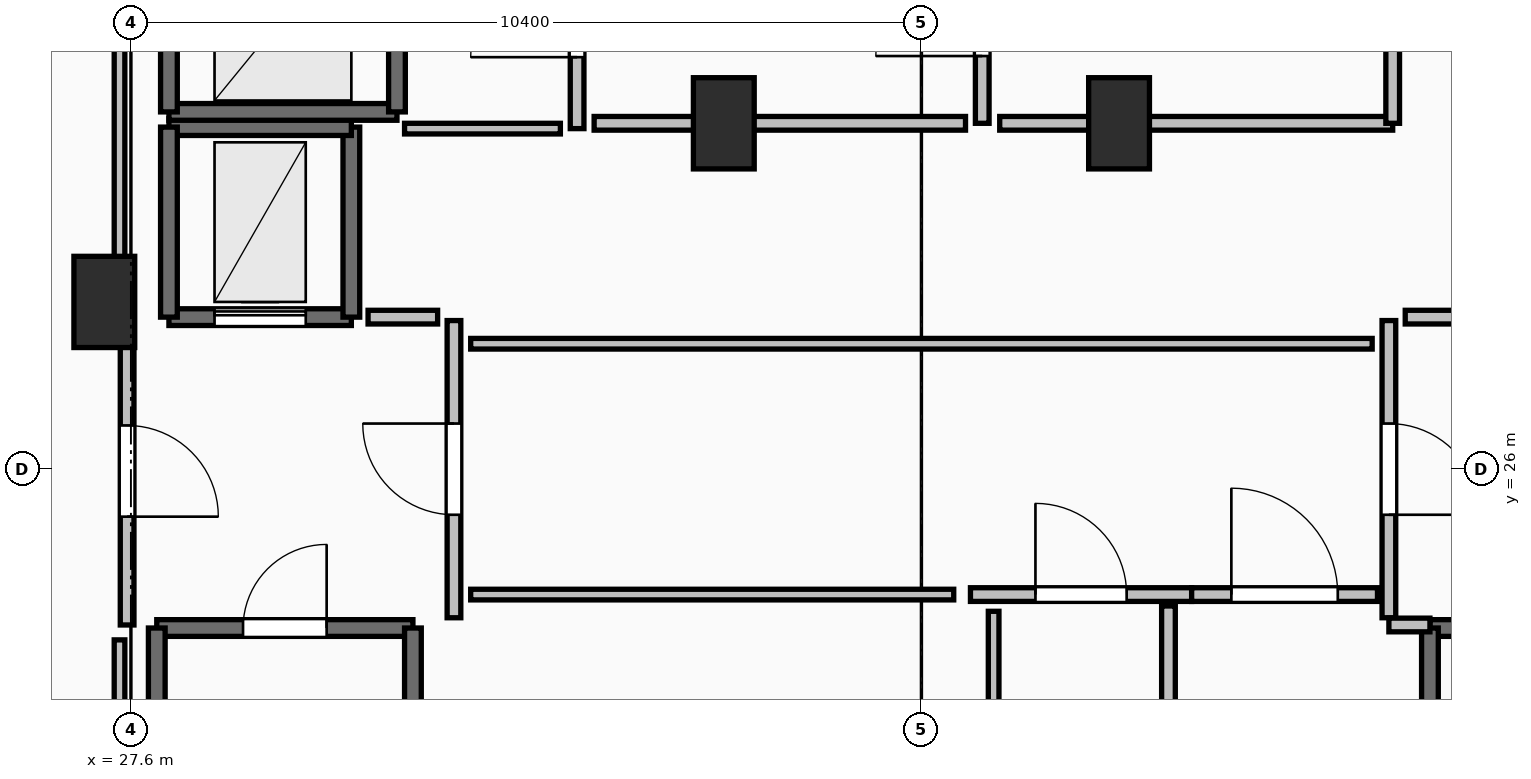
"""IFC4 building model, lengths in metres.
Left out: names, types, materials, properties, quantities, classifications, styles, units other than length and angle.
Written with IfcOpenShell. Run it as: python <this file> out.ifc"""

import sys

from ifc_helpers import new_model, si_unit, direction, frame, frame_2d, origin, origin_2d, place, context, subcontext, project, spatial, rectangle, extrude, element, fill, save


model = new_model("IFC4")
c1 = context("Model", 3, precision=1e-05, world=origin(), true_north=direction((0.0, 1.0)))
c2 = subcontext(c1, "Body", "Model", "MODEL_VIEW")
j1 = project(units=[si_unit("LENGTHUNIT", "METRE"), si_unit("PLANEANGLEUNIT", "RADIAN")], contexts=[c1])
p1 = place(None, origin())
s1 = spatial("IfcSite", under=j1, at=p1, CompositionType="ELEMENT")
p2 = place(p1, origin())
s2 = spatial("IfcBuilding", under=s1, at=p2, CompositionType="ELEMENT")
p3 = place(p2, frame((0.0, 0.0, -9.6)))
s3 = spatial("IfcBuildingStorey", under=s2, at=p3, CompositionType="ELEMENT", Elevation=-9.6)
for number, where, z_axis, x_axis in (
    (1, (27.25, 28.2, 0.0), (0.0, 0.0, 1.0), (1.0, 0.0, 0.0)),
    (2, (35.4, 30.55, 0.0), (0.0, 0.0, 1.0), (1.0, 0.0, 0.0)),
    (3, (40.6, 30.55, 0.0), (0.0, 0.0, 1.0), (1.0, 0.0, 0.0)),
):
    element("IfcColumn", number, at=place(p3, frame(where, z_axis=z_axis, x_axis=x_axis)), inside=s3, PredefinedType="PILASTER", context=c2, shape_type="SweptSolid", body=[
        extrude(rectangle(XDim=0.8, YDim=1.2, at=origin_2d()), origin(), (0.0, 0.0, 1.0), 4.8),
    ])
p4 = place(p3, frame((27.94, 23.91, 0.0), z_axis=(0.0, 0.0, 1.0), x_axis=(1.0, 0.0, 0.0)))
e4 = element("IfcWall", 4, at=p4, inside=s3, PredefinedType="SOLIDWALL", context=c2, shape_type="SweptSolid", body=[
    extrude(rectangle(XDim=3.37, YDim=0.22, at=frame_2d((1.685, 0.0))), origin(), (0.0, 0.0, 1.0), 4.45),
])
p5 = place(p4, frame((1.135, 0.0, 0.0)))
e5 = element("IfcOpeningElement", 5, at=p5, cuts=e4, PredefinedType="OPENING", context=c2, shape_type="SweptSolid", body=[
    extrude(rectangle(XDim=1.1, YDim=2.15, at=frame_2d((0.55, 1.075))), frame((0.0, 0.125, 0.0), z_axis=(0.0, -1.0, 0.0), x_axis=(1.0, 0.0, 0.0)), (0.0, 0.0, 1.0), 0.25),
])
for number, where, z_axis, x_axis in (
    (6, (31.31, 23.91, 0.0), (0.0, 0.0, 1.0), (0.0, -1.0, 0.0)),
    (7, (27.94, 16.49, 0.0), (0.0, 0.0, 1.0), (0.0, 1.0, 0.0)),
):
    element("IfcWall", number, at=place(p3, frame(where, z_axis=z_axis, x_axis=x_axis)), inside=s3, PredefinedType="SOLIDWALL", context=c2, shape_type="SweptSolid", body=[
        extrude(rectangle(XDim=7.42, YDim=0.22, at=frame_2d((3.71, 0.0))), origin(), (0.0, 0.0, 1.0), 4.45),
    ])
p6 = place(p3, frame((44.69, 23.91, 0.0), z_axis=(0.0, 0.0, 1.0), x_axis=(1.0, 0.0, 0.0)))
e8 = element("IfcWall", 8, at=p6, inside=s3, PredefinedType="SOLIDWALL", context=c2, shape_type="SweptSolid", body=[
    extrude(rectangle(XDim=3.37, YDim=0.22, at=frame_2d((1.685, 0.0))), origin(), (0.0, 0.0, 1.0), 4.45),
])
p7 = place(p6, frame((1.135, 0.0, 0.0)))
e9 = element("IfcOpeningElement", 9, at=p7, cuts=e8, PredefinedType="OPENING", context=c2, shape_type="SweptSolid", body=[
    extrude(rectangle(XDim=1.1, YDim=2.15, at=frame_2d((0.55, 1.075))), frame((0.0, 0.125, 0.0), z_axis=(0.0, -1.0, 0.0), x_axis=(1.0, 0.0, 0.0)), (0.0, 0.0, 1.0), 0.25),
])
p8 = place(p3, frame((44.69, 16.49, 0.0), z_axis=(0.0, 0.0, 1.0), x_axis=(0.0, 1.0, 0.0)))
e10 = element("IfcWall", 10, at=p8, inside=s3, PredefinedType="SOLIDWALL", context=c2, shape_type="SweptSolid", body=[
    extrude(rectangle(XDim=7.42, YDim=0.22, at=frame_2d((3.71, 0.0))), origin(), (0.0, 0.0, 1.0), 4.45),
])
p9 = place(p3, frame((28.1, 28.0, 0.0), z_axis=(0.0, 0.0, 1.0), x_axis=(1.0, 0.0, 0.0)))
e11 = element("IfcWall", 11, at=p9, inside=s3, PredefinedType="SHEAR", context=c2, shape_type="SweptSolid", body=[
    extrude(rectangle(XDim=2.4, YDim=0.22, at=frame_2d((1.2, 0.0))), origin(), (0.0, 0.0, 1.0), 4.45),
])
p10 = place(p9, frame((0.6, 0.0, 0.0)))
e12 = element("IfcOpeningElement", 12, at=p10, cuts=e11, PredefinedType="OPENING", context=c2, shape_type="SweptSolid", body=[
    extrude(rectangle(XDim=1.2, YDim=2.2, at=frame_2d((0.6, 1.1))), frame((0.0, 0.125, 0.0), z_axis=(0.0, -1.0, 0.0), x_axis=(1.0, 0.0, 0.0)), (0.0, 0.0, 1.0), 0.25),
])
p11 = place(p3, frame((30.5, 28.0, 0.0), z_axis=(0.0, 0.0, 1.0), x_axis=(0.0, 1.0, 0.0)))
e13 = element("IfcWall", 13, at=p11, inside=s3, PredefinedType="SHEAR", context=c2, shape_type="SweptSolid", body=[
    extrude(rectangle(XDim=2.5, YDim=0.22, at=frame_2d((1.25, 0.0))), origin(), (0.0, 0.0, 1.0), 4.45),
])
p12 = place(p3, frame((30.5, 30.5, 0.0), z_axis=(0.0, 0.0, 1.0), x_axis=(-1.0, 0.0, 0.0)))
e14 = element("IfcWall", 14, at=p12, inside=s3, PredefinedType="SHEAR", context=c2, shape_type="SweptSolid", body=[
    extrude(rectangle(XDim=2.4, YDim=0.22, at=frame_2d((1.2, 0.0))), origin(), (0.0, 0.0, 1.0), 4.45),
])
p13 = place(p3, frame((28.1, 30.5, 0.0), z_axis=(0.0, 0.0, 1.0), x_axis=(0.0, -1.0, 0.0)))
e15 = element("IfcWall", 15, at=p13, inside=s3, PredefinedType="SHEAR", context=c2, shape_type="SweptSolid", body=[
    extrude(rectangle(XDim=2.5, YDim=0.22, at=frame_2d((1.25, 0.0))), origin(), (0.0, 0.0, 1.0), 4.45),
])
p14 = place(p3, frame((28.1, 30.7, 0.0), z_axis=(0.0, 0.0, 1.0), x_axis=(1.0, 0.0, 0.0)))
e16 = element("IfcWall", 16, at=p14, inside=s3, PredefinedType="SOLIDWALL", context=c2, shape_type="SweptSolid", body=[
    extrude(rectangle(XDim=3.0, YDim=0.22, at=frame_2d((1.5, 0.0))), origin(), (0.0, 0.0, 1.0), 4.45),
])
for number, where, z_axis, x_axis in (
    (17, (31.1, 30.7, 0.0), (0.0, 0.0, 1.0), (0.0, 1.0, 0.0)),
    (18, (28.1, 33.2, 0.0), (0.0, 0.0, 1.0), (0.0, -1.0, 0.0)),
):
    element("IfcWall", number, at=place(p3, frame(where, z_axis=z_axis, x_axis=x_axis)), inside=s3, PredefinedType="SOLIDWALL", context=c2, shape_type="SweptSolid", body=[
        extrude(rectangle(XDim=2.5, YDim=0.22, at=frame_2d((1.25, 0.0))), origin(), (0.0, 0.0, 1.0), 4.45),
    ])
p15 = place(p3, frame((31.85, 24.045, 0.0), z_axis=(0.0, 0.0, 1.0), x_axis=(0.0, 1.0, 0.0)))
e19 = element("IfcWall", 19, at=p15, inside=s3, PredefinedType="PARTITIONING", context=c2, shape_type="SweptSolid", body=[
    extrude(rectangle(XDim=3.91, YDim=0.18, at=frame_2d((1.955, 0.0))), origin(), (0.0, 0.0, 1.0), 4.45),
])
p16 = place(p15, frame((1.355, 0.0, 0.0)))
e20 = element("IfcOpeningElement", 20, at=p16, cuts=e19, PredefinedType="OPENING", context=c2, shape_type="SweptSolid", body=[
    extrude(rectangle(XDim=1.2, YDim=2.15, at=frame_2d((0.6, 1.075))), frame((0.0, 0.105, 0.0), z_axis=(0.0, -1.0, 0.0), x_axis=(1.0, 0.0, 0.0)), (0.0, 0.0, 1.0), 0.21),
])
p17 = place(p3, frame((27.55, 28.0, 0.0), z_axis=(0.0, 0.0, 1.0), x_axis=(0.0, -1.0, 0.0)))
e21 = element("IfcWall", 21, at=p17, inside=s3, PredefinedType="PARTITIONING", context=c2, shape_type="SweptSolid", body=[
    extrude(rectangle(XDim=4.05, YDim=0.18, at=frame_2d((2.025, 0.0))), origin(), (0.0, 0.0, 1.0), 3.03),
])
p18 = place(p17, frame((1.425, 0.0, 0.0)))
e22 = element("IfcOpeningElement", 22, at=p18, cuts=e21, PredefinedType="OPENING", context=c2, shape_type="SweptSolid", body=[
    extrude(rectangle(XDim=1.2, YDim=2.15, at=frame_2d((0.6, 1.075))), frame((0.0, 0.105, 0.0), z_axis=(0.0, -1.0, 0.0), x_axis=(1.0, 0.0, 0.0)), (0.0, 0.0, 1.0), 0.21),
])
p19 = place(p3, frame((44.15, 27.955, 0.0), z_axis=(0.0, 0.0, 1.0), x_axis=(0.0, -1.0, 0.0)))
e23 = element("IfcWall", 23, at=p19, inside=s3, PredefinedType="PARTITIONING", context=c2, shape_type="SweptSolid", body=[
    extrude(rectangle(XDim=3.91, YDim=0.18, at=frame_2d((1.955, 0.0))), origin(), (0.0, 0.0, 1.0), 4.45),
])
p20 = place(p19, frame((1.355, 0.0, 0.0)))
e24 = element("IfcOpeningElement", 24, at=p20, cuts=e23, PredefinedType="OPENING", context=c2, shape_type="SweptSolid", body=[
    extrude(rectangle(XDim=1.2, YDim=2.15, at=frame_2d((0.6, 1.075))), frame((0.0, 0.105, 0.0), z_axis=(0.0, -1.0, 0.0), x_axis=(1.0, 0.0, 0.0)), (0.0, 0.0, 1.0), 0.21),
])
p21 = place(p3, frame((44.15, 23.95, 0.0), z_axis=(0.0, 0.0, 1.0), x_axis=(1.0, 0.0, 0.0)))
e25 = element("IfcWall", 25, at=p21, inside=s3, PredefinedType="PARTITIONING", context=c2, shape_type="SweptSolid", body=[
    extrude(rectangle(XDim=0.54, YDim=0.18, at=frame_2d((0.27, 0.0))), origin(), (0.0, 0.0, 1.0), 4.45),
])
p22 = place(p3, frame((33.47, 30.48, 0.0), z_axis=(0.0, 0.0, 1.0), x_axis=(0.0, 1.0, 0.0)))
e26 = element("IfcWall", 26, at=p22, inside=s3, PredefinedType="PARTITIONING", context=c2, shape_type="SweptSolid", body=[
    extrude(rectangle(XDim=3.28, YDim=0.18, at=frame_2d((1.64, 0.0))), origin(), (0.0, 0.0, 1.0), 4.45),
])
p23 = place(p22, frame((0.94, 0.0, 0.0)))
e27 = element("IfcOpeningElement", 27, at=p23, cuts=e26, PredefinedType="OPENING", context=c2, shape_type="SweptSolid", body=[
    extrude(rectangle(XDim=1.4, YDim=2.2, at=frame_2d((0.7, 1.1))), frame((0.0, 0.105, 0.0), z_axis=(0.0, -1.0, 0.0), x_axis=(1.0, 0.0, 0.0)), (0.0, 0.0, 1.0), 0.21),
])
p24 = place(p3, frame((38.645, 24.35, 0.0), z_axis=(0.0, 0.0, 1.0), x_axis=(1.0, 0.0, 0.0)))
e28 = element("IfcWall", 28, at=p24, inside=s3, PredefinedType="PARTITIONING", context=c2, shape_type="SweptSolid", body=[
    extrude(rectangle(XDim=2.91, YDim=0.18, at=frame_2d((1.455, 0.0))), origin(), (0.0, 0.0, 1.0), 4.45),
])
p25 = place(p24, frame((0.855, 0.0, 0.0)))
e29 = element("IfcOpeningElement", 29, at=p25, cuts=e28, PredefinedType="OPENING", context=c2, shape_type="SweptSolid", body=[
    extrude(rectangle(XDim=1.2, YDim=2.15, at=frame_2d((0.6, 1.075))), frame((0.0, 0.105, 0.0), z_axis=(0.0, -1.0, 0.0), x_axis=(1.0, 0.0, 0.0)), (0.0, 0.0, 1.0), 0.21),
])
p26 = place(p3, frame((41.555, 24.35, 0.0), z_axis=(0.0, 0.0, 1.0), x_axis=(1.0, 0.0, 0.0)))
e30 = element("IfcWall", 30, at=p26, inside=s3, PredefinedType="PARTITIONING", context=c2, shape_type="SweptSolid", body=[
    extrude(rectangle(XDim=2.445, YDim=0.18, at=frame_2d((1.223, 0.0))), origin(), (0.0, 0.0, 1.0), 4.45),
])
p27 = place(p26, frame((0.522, 0.0, 0.0)))
e31 = element("IfcOpeningElement", 31, at=p27, cuts=e30, PredefinedType="OPENING", context=c2, shape_type="SweptSolid", body=[
    extrude(rectangle(XDim=1.4, YDim=2.2, at=frame_2d((0.7, 1.1))), frame((0.0, 0.105, 0.0), z_axis=(0.0, -1.0, 0.0), x_axis=(1.0, 0.0, 0.0)), (0.0, 0.0, 1.0), 0.21),
])
p28 = place(p3, frame((41.25, 19.105, 0.0), z_axis=(0.0, 0.0, 1.0), x_axis=(0.0, 1.0, 0.0)))
e32 = element("IfcWall", 32, at=p28, inside=s3, PredefinedType="PARTITIONING", context=c2, shape_type="SweptSolid", body=[
    extrude(rectangle(XDim=5.095, YDim=0.18, at=frame_2d((2.547, 0.0))), origin(), (0.0, 0.0, 1.0), 3.03),
])
p29 = place(p28, frame((1.847, 0.0, 0.0)))
e33 = element("IfcOpeningElement", 33, at=p29, cuts=e32, PredefinedType="OPENING", context=c2, shape_type="SweptSolid", body=[
    extrude(rectangle(XDim=1.4, YDim=2.2, at=frame_2d((0.7, 1.1))), frame((0.0, 0.105, 0.0), z_axis=(0.0, -1.0, 0.0), x_axis=(1.0, 0.0, 0.0)), (0.0, 0.0, 1.0), 0.21),
])
p30 = place(p3, frame((38.8, 30.55, 0.0), z_axis=(0.0, 0.0, 1.0), x_axis=(0.0, 1.0, 0.0)))
e34 = element("IfcWall", 34, at=p30, inside=s3, PredefinedType="PARTITIONING", context=c2, shape_type="SweptSolid", body=[
    extrude(rectangle(XDim=3.17, YDim=0.18, at=frame_2d((1.585, 0.0))), origin(), (0.0, 0.0, 1.0), 3.03),
])
p31 = place(p30, frame((0.885, 0.0, 0.0)))
e35 = element("IfcOpeningElement", 35, at=p31, cuts=e34, PredefinedType="OPENING", context=c2, shape_type="SweptSolid", body=[
    extrude(rectangle(XDim=1.4, YDim=2.2, at=frame_2d((0.7, 1.1))), frame((0.0, 0.105, 0.0), z_axis=(0.0, -1.0, 0.0), x_axis=(1.0, 0.0, 0.0)), (0.0, 0.0, 1.0), 0.21),
])
for number, where, z_axis, x_axis in (
    (36, (31.635, 28.0, 0.0), (0.0, 0.0, 1.0), (-1.0, 0.0, 0.0)),
    (37, (45.28, 28.0, 0.0), (0.0, 0.0, 1.0), (-1.0, 0.0, 0.0)),
):
    element("IfcWall", number, at=place(p3, frame(where, z_axis=z_axis, x_axis=x_axis)), inside=s3, PredefinedType="PARTITIONING", context=c2, shape_type="SweptSolid", body=[
        extrude(rectangle(XDim=0.915, YDim=0.18, at=frame_2d((0.458, 0.0))), origin(), (0.0, 0.0, 1.0), 4.45),
    ])
p32 = place(p3, frame((31.2, 30.48, 0.0), z_axis=(0.0, 0.0, 1.0), x_axis=(1.0, 0.0, 0.0)))
e38 = element("IfcWall", 38, at=p32, inside=s3, PredefinedType="PARTITIONING", context=c2, shape_type="SweptSolid", body=[
    extrude(rectangle(XDim=2.05, YDim=0.14, at=frame_2d((1.025, 0.0))), origin(), (0.0, 0.0, 1.0), 4.45),
])
p33 = place(p3, frame((43.93, 27.65, 0.0), z_axis=(0.0, 0.0, 1.0), x_axis=(-1.0, 0.0, 0.0)))
e39 = element("IfcWall", 39, at=p33, inside=s3, PredefinedType="PARTITIONING", context=c2, shape_type="SweptSolid", body=[
    extrude(rectangle(XDim=11.86, YDim=0.14, at=frame_2d((5.93, 0.0))), origin(), (0.0, 0.0, 1.0), 4.45),
])
p34 = place(p3, frame((32.07, 24.35, 0.0), z_axis=(0.0, 0.0, 1.0), x_axis=(1.0, 0.0, 0.0)))
e40 = element("IfcWall", 40, at=p34, inside=s3, PredefinedType="PARTITIONING", context=c2, shape_type="SweptSolid", body=[
    extrude(rectangle(XDim=6.355, YDim=0.14, at=frame_2d((3.177, 0.0))), origin(), (0.0, 0.0, 1.0), 4.45),
])
p35 = place(p3, frame((38.95, 24.13, 0.0), z_axis=(0.0, 0.0, 1.0), x_axis=(0.0, -1.0, 0.0)))
e41 = element("IfcWall", 41, at=p35, inside=s3, PredefinedType="PARTITIONING", context=c2, shape_type="SweptSolid", body=[
    extrude(rectangle(XDim=2.155, YDim=0.14, at=frame_2d((1.077, 0.0))), origin(), (0.0, 0.0, 1.0), 3.03),
])
p36 = place(p3, frame((33.694, 30.55, 0.0), z_axis=(0.0, 0.0, 1.0), x_axis=(1.0, 0.0, 0.0)))
e42 = element("IfcWall", 42, at=p36, inside=s3, PredefinedType="PARTITIONING", context=c2, shape_type="SweptSolid", body=[
    extrude(rectangle(XDim=4.886, YDim=0.18, at=frame_2d((2.443, 0.0))), origin(), (0.0, 0.0, 1.0), 3.03),
])
p37 = place(p3, frame((39.03, 30.55, 0.0), z_axis=(0.0, 0.0, 1.0), x_axis=(1.0, 0.0, 0.0)))
e43 = element("IfcWall", 43, at=p37, inside=s3, PredefinedType="PARTITIONING", context=c2, shape_type="SweptSolid", body=[
    extrude(rectangle(XDim=5.17, YDim=0.18, at=frame_2d((2.585, 0.0))), origin(), (0.0, 0.0, 1.0), 3.03),
])
p38 = place(p3, frame((44.2, 30.55, 0.0), z_axis=(0.0, 0.0, 1.0), x_axis=(0.0, 1.0, 0.0)))
e44 = element("IfcWall", 44, at=p38, inside=s3, PredefinedType="PARTITIONING", context=c2, shape_type="SweptSolid", body=[
    extrude(rectangle(XDim=2.34, YDim=0.18, at=frame_2d((1.17, 0.0))), origin(), (0.0, 0.0, 1.0), 4.45),
])
p39 = place(p3, frame((27.45, 16.24, 0.0), z_axis=(0.0, 0.0, 1.0), x_axis=(0.0, 1.0, 0.0)))
e45 = element("IfcWall", 45, at=p39, inside=s3, PredefinedType="PARTITIONING", context=c2, shape_type="SweptSolid", body=[
    extrude(rectangle(XDim=7.514, YDim=0.14, at=frame_2d((3.757, 0.0))), origin(), (0.0, 0.0, 1.0), 3.03),
])
p40 = place(p3, frame((27.45, 28.196, 0.0), z_axis=(0.0, 0.0, 1.0), x_axis=(0.0, 1.0, 0.0)))
e46 = element("IfcWall", 46, at=p40, inside=s3, PredefinedType="PARTITIONING", context=c2, shape_type="SweptSolid", body=[
    extrude(rectangle(XDim=5.254, YDim=0.14, at=frame_2d((2.627, 0.0))), origin(), (0.0, 0.0, 1.0), 3.03),
])
p41 = place(p5, origin())
e47 = element("IfcDoor", 47, at=p41, inside=s3, OperationType="SINGLE_SWING_RIGHT", PredefinedType="DOOR", context=c2, shape_type="SweptSolid", body=[
    extrude(rectangle(XDim=1.1, YDim=2.15, at=frame_2d((0.55, 1.075))), frame((0.0, 0.025, 0.0), z_axis=(0.0, -1.0, 0.0), x_axis=(1.0, 0.0, 0.0)), (0.0, 0.0, 1.0), 0.05),
])
fill(e5, e47)
p42 = place(p10, origin())
e48 = element("IfcDoor", 48, at=p42, inside=s3, OperationType="SLIDING_TO_LEFT", PredefinedType="DOOR", context=c2, shape_type="SweptSolid", body=[
    extrude(rectangle(XDim=1.2, YDim=2.2, at=frame_2d((0.6, 1.1))), frame((0.0, 0.025, 0.0), z_axis=(0.0, -1.0, 0.0), x_axis=(1.0, 0.0, 0.0)), (0.0, 0.0, 1.0), 0.05),
])
fill(e12, e48)
p43 = place(p16, origin())
e49 = element("IfcDoor", 49, at=p43, inside=s3, OperationType="SINGLE_SWING_RIGHT", PredefinedType="DOOR", context=c2, shape_type="SweptSolid", body=[
    extrude(rectangle(XDim=1.2, YDim=2.15, at=frame_2d((0.6, 1.075))), frame((0.0, 0.025, 0.0), z_axis=(0.0, -1.0, 0.0), x_axis=(1.0, 0.0, 0.0)), (0.0, 0.0, 1.0), 0.05),
])
fill(e20, e49)
p44 = place(p18, origin())
e50 = element("IfcDoor", 50, at=p44, inside=s3, OperationType="SINGLE_SWING_RIGHT", PredefinedType="DOOR", context=c2, shape_type="SweptSolid", body=[
    extrude(rectangle(XDim=1.2, YDim=2.15, at=frame_2d((0.6, 1.075))), frame((0.0, 0.025, 0.0), z_axis=(0.0, -1.0, 0.0), x_axis=(1.0, 0.0, 0.0)), (0.0, 0.0, 1.0), 0.05),
])
fill(e22, e50)
p45 = place(p20, origin())
e51 = element("IfcDoor", 51, at=p45, inside=s3, OperationType="SINGLE_SWING_RIGHT", PredefinedType="DOOR", context=c2, shape_type="SweptSolid", body=[
    extrude(rectangle(XDim=1.2, YDim=2.15, at=frame_2d((0.6, 1.075))), frame((0.0, 0.025, 0.0), z_axis=(0.0, -1.0, 0.0), x_axis=(1.0, 0.0, 0.0)), (0.0, 0.0, 1.0), 0.05),
])
fill(e24, e51)
p46 = place(p23, origin())
e52 = element("IfcDoor", 52, at=p46, inside=s3, OperationType="DOUBLE_SWING_LEFT", PredefinedType="DOOR", context=c2, shape_type="SweptSolid", body=[
    extrude(rectangle(XDim=1.4, YDim=2.2, at=frame_2d((0.7, 1.1))), frame((0.0, 0.025, 0.0), z_axis=(0.0, -1.0, 0.0), x_axis=(1.0, 0.0, 0.0)), (0.0, 0.0, 1.0), 0.05),
])
fill(e27, e52)
p47 = place(p25, origin())
e53 = element("IfcDoor", 53, at=p47, inside=s3, OperationType="SINGLE_SWING_LEFT", PredefinedType="DOOR", context=c2, shape_type="SweptSolid", body=[
    extrude(rectangle(XDim=1.2, YDim=2.15, at=frame_2d((0.6, 1.075))), frame((0.0, 0.025, 0.0), z_axis=(0.0, -1.0, 0.0), x_axis=(1.0, 0.0, 0.0)), (0.0, 0.0, 1.0), 0.05),
])
fill(e29, e53)
p48 = place(p27, origin())
e54 = element("IfcDoor", 54, at=p48, inside=s3, OperationType="DOUBLE_SWING_LEFT", PredefinedType="DOOR", context=c2, shape_type="SweptSolid", body=[
    extrude(rectangle(XDim=1.4, YDim=2.2, at=frame_2d((0.7, 1.1))), frame((0.0, 0.025, 0.0), z_axis=(0.0, -1.0, 0.0), x_axis=(1.0, 0.0, 0.0)), (0.0, 0.0, 1.0), 0.05),
])
fill(e31, e54)
p49 = place(p31, origin())
e55 = element("IfcDoor", 55, at=p49, inside=s3, OperationType="DOUBLE_SWING_LEFT", PredefinedType="DOOR", context=c2, shape_type="SweptSolid", body=[
    extrude(rectangle(XDim=1.4, YDim=2.2, at=frame_2d((0.7, 1.1))), frame((0.0, 0.025, 0.0), z_axis=(0.0, -1.0, 0.0), x_axis=(1.0, 0.0, 0.0)), (0.0, 0.0, 1.0), 0.05),
])
fill(e35, e55)
save(model, sys.argv[1])
